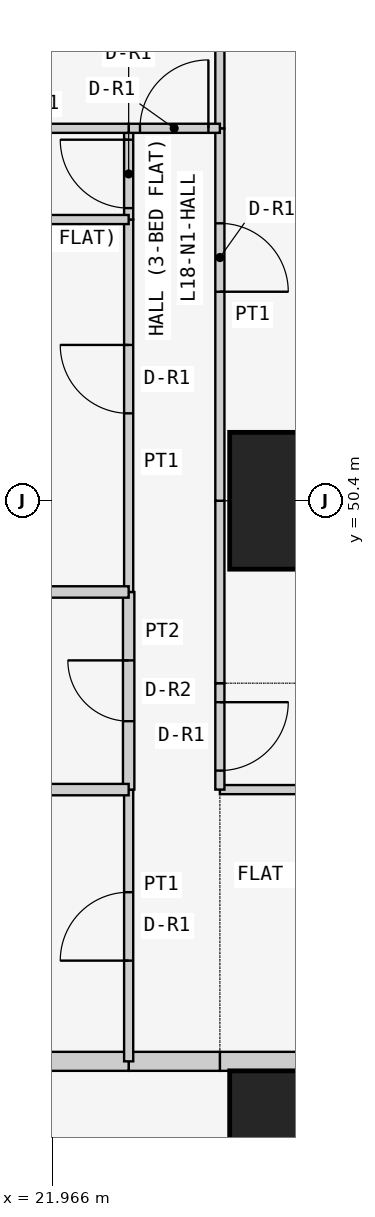
"""IFC4 building model, lengths in metres.
Left out: names, types, materials, properties, quantities, classifications, styles, units other than length and angle.
Written with IfcOpenShell. Run it as: python <this file> out.ifc"""

import sys

from ifc_helpers import new_model, si_unit, direction, frame, frame_2d, origin, origin_2d, place, context, subcontext, project, spatial, rectangle, extrude, element, fill, save


model = new_model("IFC4")
c1 = context("Model", 3, precision=1e-05, world=origin(), true_north=direction((0.0, 1.0)))
c2 = subcontext(c1, "Body", "Model", "MODEL_VIEW")
j1 = project(units=[si_unit("LENGTHUNIT", "METRE"), si_unit("PLANEANGLEUNIT", "RADIAN")], contexts=[c1])
p1 = place(None, origin())
s1 = spatial("IfcSite", under=j1, at=p1, CompositionType="ELEMENT")
p2 = place(p1, origin())
s2 = spatial("IfcBuilding", under=s1, at=p2, CompositionType="ELEMENT")
p3 = place(p2, frame((0.0, 0.0, 74.1)))
s3 = spatial("IfcBuildingStorey", under=s2, at=p3, CompositionType="ELEMENT", Elevation=74.1)
for number, where, z_axis, x_axis in (
    (1, (25.2, 42.0, 0.0), (0.0, 0.0, 1.0), (1.0, 0.0, 0.0)),
    (2, (25.2, 50.4, 0.0), (0.0, 0.0, 1.0), (1.0, 0.0, 0.0)),
):
    element("IfcColumn", number, at=place(p3, frame(where, z_axis=z_axis, x_axis=x_axis)), inside=s3, PredefinedType="COLUMN", context=c2, shape_type="SweptSolid", body=[
        extrude(rectangle(XDim=1.8, YDim=1.8, at=origin_2d()), origin(), (0.0, 0.0, 1.0), 3.6),
    ])
p4 = place(p3, frame((24.171, 43.025, 0.0), z_axis=(0.0, 0.0, 1.0), x_axis=(1.0, 0.0, 0.0)))
e3 = element("IfcWall", 3, at=p4, inside=s3, PredefinedType="PARTITIONING", context=c2, shape_type="SweptSolid", body=[
    extrude(rectangle(XDim=5.229, YDim=0.25, at=frame_2d((2.615, 0.0))), origin(), (0.0, 0.0, 1.0), 3.45),
])
p5 = place(p4, frame((2.129, 0.0, 0.0)))
e4 = element("IfcOpeningElement", 4, at=p5, cuts=e3, PredefinedType="OPENING", context=c2, shape_type="SweptSolid", body=[
    extrude(rectangle(XDim=1.0, YDim=2.1, at=frame_2d((0.5, 1.05))), frame((0.0, 0.135, 0.0), z_axis=(0.0, -1.0, 0.0), x_axis=(1.0, 0.0, 0.0)), (0.0, 0.0, 1.0), 0.27),
])
p6 = place(p3, frame((22.971, 43.025, 0.0), z_axis=(0.0, 0.0, 1.0), x_axis=(1.0, 0.0, 0.0)))
e5 = element("IfcWall", 5, at=p6, inside=s3, PredefinedType="PARTITIONING", context=c2, shape_type="SweptSolid", body=[
    extrude(rectangle(XDim=1.2, YDim=0.25, at=frame_2d((0.6, 0.0))), origin(), (0.0, 0.0, 1.0), 3.45),
])
p7 = place(p3, frame((16.1, 43.025, 0.0), z_axis=(0.0, 0.0, 1.0), x_axis=(1.0, 0.0, 0.0)))
e6 = element("IfcWall", 6, at=p7, inside=s3, PredefinedType="PARTITIONING", context=c2, shape_type="SweptSolid", body=[
    extrude(rectangle(XDim=6.871, YDim=0.25, at=frame_2d((3.436, 0.0))), origin(), (0.0, 0.0, 1.0), 3.45),
])
p8 = place(p3, frame((29.4, 46.6, 0.0), z_axis=(0.0, 0.0, 1.0), x_axis=(-1.0, 0.0, 0.0)))
e7 = element("IfcWall", 7, at=p8, inside=s3, PredefinedType="PARTITIONING", context=c2, shape_type="SweptSolid", body=[
    extrude(rectangle(XDim=5.229, YDim=0.12, at=frame_2d((2.615, 0.0))), origin(), (0.0, 0.0, 1.0), 3.45),
])
p9 = place(p3, frame((24.171, 48.0, 0.0), z_axis=(0.0, 0.0, 1.0), x_axis=(0.0, -1.0, 0.0)))
e8 = element("IfcWall", 8, at=p9, inside=s3, PredefinedType="PARTITIONING", context=c2, shape_type="SweptSolid", body=[
    extrude(rectangle(XDim=1.4, YDim=0.12, at=frame_2d((0.7, 0.0))), origin(), (0.0, 0.0, 1.0), 3.45),
])
p10 = place(p9, frame((0.25, 0.0, 0.0)))
e9 = element("IfcOpeningElement", 9, at=p10, cuts=e8, PredefinedType="OPENING", context=c2, shape_type="SweptSolid", body=[
    extrude(rectangle(XDim=0.9, YDim=2.1, at=frame_2d((0.45, 1.05))), frame((0.0, 0.07, 0.0), z_axis=(0.0, -1.0, 0.0), x_axis=(1.0, 0.0, 0.0)), (0.0, 0.0, 1.0), 0.14),
])
p11 = place(p3, frame((24.171, 50.4, 0.0), z_axis=(0.0, 0.0, 1.0), x_axis=(0.0, -1.0, 0.0)))
e10 = element("IfcWall", 10, at=p11, inside=s3, PredefinedType="PARTITIONING", context=c2, shape_type="SweptSolid", body=[
    extrude(rectangle(XDim=2.4, YDim=0.12, at=frame_2d((1.2, 0.0))), origin(), (0.0, 0.0, 1.0), 3.45),
])
p12 = place(p3, frame((24.171, 55.3, 0.0), z_axis=(0.0, 0.0, 1.0), x_axis=(0.0, -1.0, 0.0)))
e11 = element("IfcWall", 11, at=p12, inside=s3, PredefinedType="PARTITIONING", context=c2, shape_type="SweptSolid", body=[
    extrude(rectangle(XDim=4.9, YDim=0.12, at=frame_2d((2.45, 0.0))), origin(), (0.0, 0.0, 1.0), 3.45),
])
p13 = place(p12, frame((1.25, 0.0, 0.0)))
e12 = element("IfcOpeningElement", 12, at=p13, cuts=e11, PredefinedType="OPENING", context=c2, shape_type="SweptSolid", body=[
    extrude(rectangle(XDim=0.9, YDim=2.1, at=frame_2d((0.45, 1.05))), frame((0.0, 0.07, 0.0), z_axis=(0.0, -1.0, 0.0), x_axis=(1.0, 0.0, 0.0)), (0.0, 0.0, 1.0), 0.14),
])
p14 = place(p3, frame((24.171, 59.45, 0.0), z_axis=(0.0, 0.0, 1.0), x_axis=(0.0, -1.0, 0.0)))
e13 = element("IfcWall", 13, at=p14, inside=s3, PredefinedType="PARTITIONING", context=c2, shape_type="SweptSolid", body=[
    extrude(rectangle(XDim=4.15, YDim=0.12, at=frame_2d((2.075, 0.0))), origin(), (0.0, 0.0, 1.0), 3.45),
])
p15 = place(p3, frame((22.971, 46.6, 0.0), z_axis=(0.0, 0.0, 1.0), x_axis=(0.0, -1.0, 0.0)))
e14 = element("IfcWall", 14, at=p15, inside=s3, PredefinedType="PARTITIONING", context=c2, shape_type="SweptSolid", body=[
    extrude(rectangle(XDim=3.575, YDim=0.12, at=frame_2d((1.788, 0.0))), origin(), (0.0, 0.0, 1.0), 3.45),
])
p16 = place(p15, frame((1.35, 0.0, 0.0)))
e15 = element("IfcOpeningElement", 15, at=p16, cuts=e14, PredefinedType="OPENING", context=c2, shape_type="SweptSolid", body=[
    extrude(rectangle(XDim=0.9, YDim=2.1, at=frame_2d((0.45, 1.05))), frame((0.0, 0.07, 0.0), z_axis=(0.0, -1.0, 0.0), x_axis=(1.0, 0.0, 0.0)), (0.0, 0.0, 1.0), 0.14),
])
p17 = place(p3, frame((22.971, 49.2, 0.0), z_axis=(0.0, 0.0, 1.0), x_axis=(0.0, -1.0, 0.0)))
e16 = element("IfcWall", 16, at=p17, inside=s3, PredefinedType="PARTITIONING", context=c2, shape_type="SweptSolid", body=[
    extrude(rectangle(XDim=2.6, YDim=0.15, at=frame_2d((1.3, 0.0))), origin(), (0.0, 0.0, 1.0), 3.45),
])
p18 = place(p17, frame((0.9, 0.0, 0.0)))
e17 = element("IfcOpeningElement", 17, at=p18, cuts=e16, PredefinedType="OPENING", context=c2, shape_type="SweptSolid", body=[
    extrude(rectangle(XDim=0.8, YDim=2.1, at=frame_2d((0.4, 1.05))), frame((0.0, 0.085, 0.0), z_axis=(0.0, -1.0, 0.0), x_axis=(1.0, 0.0, 0.0)), (0.0, 0.0, 1.0), 0.17),
])
p19 = place(p3, frame((22.971, 54.1, 0.0), z_axis=(0.0, 0.0, 1.0), x_axis=(0.0, -1.0, 0.0)))
e18 = element("IfcWall", 18, at=p19, inside=s3, PredefinedType="PARTITIONING", context=c2, shape_type="SweptSolid", body=[
    extrude(rectangle(XDim=4.9, YDim=0.12, at=frame_2d((2.45, 0.0))), origin(), (0.0, 0.0, 1.0), 3.45),
])
p20 = place(p19, frame((1.65, 0.0, 0.0)))
e19 = element("IfcOpeningElement", 19, at=p20, cuts=e18, PredefinedType="OPENING", context=c2, shape_type="SweptSolid", body=[
    extrude(rectangle(XDim=0.9, YDim=2.1, at=frame_2d((0.45, 1.05))), frame((0.0, 0.07, 0.0), z_axis=(0.0, -1.0, 0.0), x_axis=(1.0, 0.0, 0.0)), (0.0, 0.0, 1.0), 0.14),
])
p21 = place(p3, frame((22.971, 55.3, 0.0), z_axis=(0.0, 0.0, 1.0), x_axis=(0.0, -1.0, 0.0)))
e20 = element("IfcWall", 20, at=p21, inside=s3, PredefinedType="PARTITIONING", context=c2, shape_type="SweptSolid", body=[
    extrude(rectangle(XDim=1.2, YDim=0.12, at=frame_2d((0.6, 0.0))), origin(), (0.0, 0.0, 1.0), 3.45),
])
p22 = place(p21, frame((0.15, 0.0, 0.0)))
e21 = element("IfcOpeningElement", 21, at=p22, cuts=e20, PredefinedType="OPENING", context=c2, shape_type="SweptSolid", body=[
    extrude(rectangle(XDim=0.9, YDim=2.1, at=frame_2d((0.45, 1.05))), frame((0.0, 0.07, 0.0), z_axis=(0.0, -1.0, 0.0), x_axis=(1.0, 0.0, 0.0)), (0.0, 0.0, 1.0), 0.14),
])
p23 = place(p3, frame((24.171, 55.3, 0.0), z_axis=(0.0, 0.0, 1.0), x_axis=(-1.0, 0.0, 0.0)))
e22 = element("IfcWall", 22, at=p23, inside=s3, PredefinedType="PARTITIONING", context=c2, shape_type="SweptSolid", body=[
    extrude(rectangle(XDim=1.2, YDim=0.12, at=frame_2d((0.6, 0.0))), origin(), (0.0, 0.0, 1.0), 3.45),
])
p24 = place(p23, frame((0.151, 0.0, 0.0)))
e23 = element("IfcOpeningElement", 23, at=p24, cuts=e22, PredefinedType="OPENING", context=c2, shape_type="SweptSolid", body=[
    extrude(rectangle(XDim=0.9, YDim=2.1, at=frame_2d((0.45, 1.05))), frame((0.0, 0.07, 0.0), z_axis=(0.0, -1.0, 0.0), x_axis=(1.0, 0.0, 0.0)), (0.0, 0.0, 1.0), 0.14),
])
for number, where, z_axis, x_axis in (
    (24, (22.971, 46.6, 0.0), (0.0, 0.0, 1.0), (-1.0, 0.0, 0.0)),
    (25, (22.971, 49.2, 0.0), (0.0, 0.0, 1.0), (-1.0, 0.0, 0.0)),
):
    element("IfcWall", number, at=place(p3, frame(where, z_axis=z_axis, x_axis=x_axis)), inside=s3, PredefinedType="PARTITIONING", context=c2, shape_type="SweptSolid", body=[
        extrude(rectangle(XDim=2.971, YDim=0.15, at=frame_2d((1.485, 0.0))), origin(), (0.0, 0.0, 1.0), 3.45),
    ])
for number, where, z_axis, x_axis in (
    (26, (22.971, 54.1, 0.0), (0.0, 0.0, 1.0), (-1.0, 0.0, 0.0)),
    (27, (22.971, 55.3, 0.0), (0.0, 0.0, 1.0), (-1.0, 0.0, 0.0)),
):
    element("IfcWall", number, at=place(p3, frame(where, z_axis=z_axis, x_axis=x_axis)), inside=s3, PredefinedType="PARTITIONING", context=c2, shape_type="SweptSolid", body=[
        extrude(rectangle(XDim=2.285, YDim=0.12, at=frame_2d((1.143, 0.0))), origin(), (0.0, 0.0, 1.0), 3.45),
    ])
p25 = place(p10, origin())
e28 = element("IfcDoor", 28, at=p25, inside=s3, OperationType="SINGLE_SWING_LEFT", PredefinedType="DOOR", context=c2, shape_type="SweptSolid", body=[
    extrude(rectangle(XDim=0.9, YDim=2.1, at=frame_2d((0.45, 1.05))), frame((0.0, 0.025, 0.0), z_axis=(0.0, -1.0, 0.0), x_axis=(1.0, 0.0, 0.0)), (0.0, 0.0, 1.0), 0.05),
])
fill(e9, e28)
p26 = place(p13, origin())
e29 = element("IfcDoor", 29, at=p26, inside=s3, OperationType="SINGLE_SWING_RIGHT", PredefinedType="DOOR", context=c2, shape_type="SweptSolid", body=[
    extrude(rectangle(XDim=0.9, YDim=2.1, at=frame_2d((0.45, 1.05))), frame((0.0, 0.025, 0.0), z_axis=(0.0, -1.0, 0.0), x_axis=(1.0, 0.0, 0.0)), (0.0, 0.0, 1.0), 0.05),
])
fill(e12, e29)
p27 = place(p16, frame((0.9, 0.0, 0.0), z_axis=(0.0, 0.0, 1.0), x_axis=(-1.0, 0.0, 0.0)))
e30 = element("IfcDoor", 30, at=p27, inside=s3, OperationType="SINGLE_SWING_LEFT", PredefinedType="DOOR", context=c2, shape_type="SweptSolid", body=[
    extrude(rectangle(XDim=0.9, YDim=2.1, at=frame_2d((0.45, 1.05))), frame((0.0, 0.025, 0.0), z_axis=(0.0, -1.0, 0.0), x_axis=(1.0, 0.0, 0.0)), (0.0, 0.0, 1.0), 0.05),
])
fill(e15, e30)
p28 = place(p18, frame((0.8, 0.0, 0.0), z_axis=(0.0, 0.0, 1.0), x_axis=(-1.0, 0.0, 0.0)))
e31 = element("IfcDoor", 31, at=p28, inside=s3, OperationType="SINGLE_SWING_RIGHT", PredefinedType="DOOR", context=c2, shape_type="SweptSolid", body=[
    extrude(rectangle(XDim=0.8, YDim=2.1, at=frame_2d((0.4, 1.05))), frame((0.0, 0.025, 0.0), z_axis=(0.0, -1.0, 0.0), x_axis=(1.0, 0.0, 0.0)), (0.0, 0.0, 1.0), 0.05),
])
fill(e17, e31)
p29 = place(p20, frame((0.9, 0.0, 0.0), z_axis=(0.0, 0.0, 1.0), x_axis=(-1.0, 0.0, 0.0)))
e32 = element("IfcDoor", 32, at=p29, inside=s3, OperationType="SINGLE_SWING_RIGHT", PredefinedType="DOOR", context=c2, shape_type="SweptSolid", body=[
    extrude(rectangle(XDim=0.9, YDim=2.1, at=frame_2d((0.45, 1.05))), frame((0.0, 0.025, 0.0), z_axis=(0.0, -1.0, 0.0), x_axis=(1.0, 0.0, 0.0)), (0.0, 0.0, 1.0), 0.05),
])
fill(e19, e32)
p30 = place(p22, frame((0.9, 0.0, 0.0), z_axis=(0.0, 0.0, 1.0), x_axis=(-1.0, 0.0, 0.0)))
e33 = element("IfcDoor", 33, at=p30, inside=s3, OperationType="SINGLE_SWING_RIGHT", PredefinedType="DOOR", context=c2, shape_type="SweptSolid", body=[
    extrude(rectangle(XDim=0.9, YDim=2.1, at=frame_2d((0.45, 1.05))), frame((0.0, 0.025, 0.0), z_axis=(0.0, -1.0, 0.0), x_axis=(1.0, 0.0, 0.0)), (0.0, 0.0, 1.0), 0.05),
])
fill(e21, e33)
p31 = place(p24, frame((0.9, 0.0, 0.0), z_axis=(0.0, 0.0, 1.0), x_axis=(-1.0, 0.0, 0.0)))
e34 = element("IfcDoor", 34, at=p31, inside=s3, OperationType="SINGLE_SWING_RIGHT", PredefinedType="DOOR", context=c2, shape_type="SweptSolid", body=[
    extrude(rectangle(XDim=0.9, YDim=2.1, at=frame_2d((0.45, 1.05))), frame((0.0, 0.025, 0.0), z_axis=(0.0, -1.0, 0.0), x_axis=(1.0, 0.0, 0.0)), (0.0, 0.0, 1.0), 0.05),
])
fill(e23, e34)
save(model, sys.argv[1])
